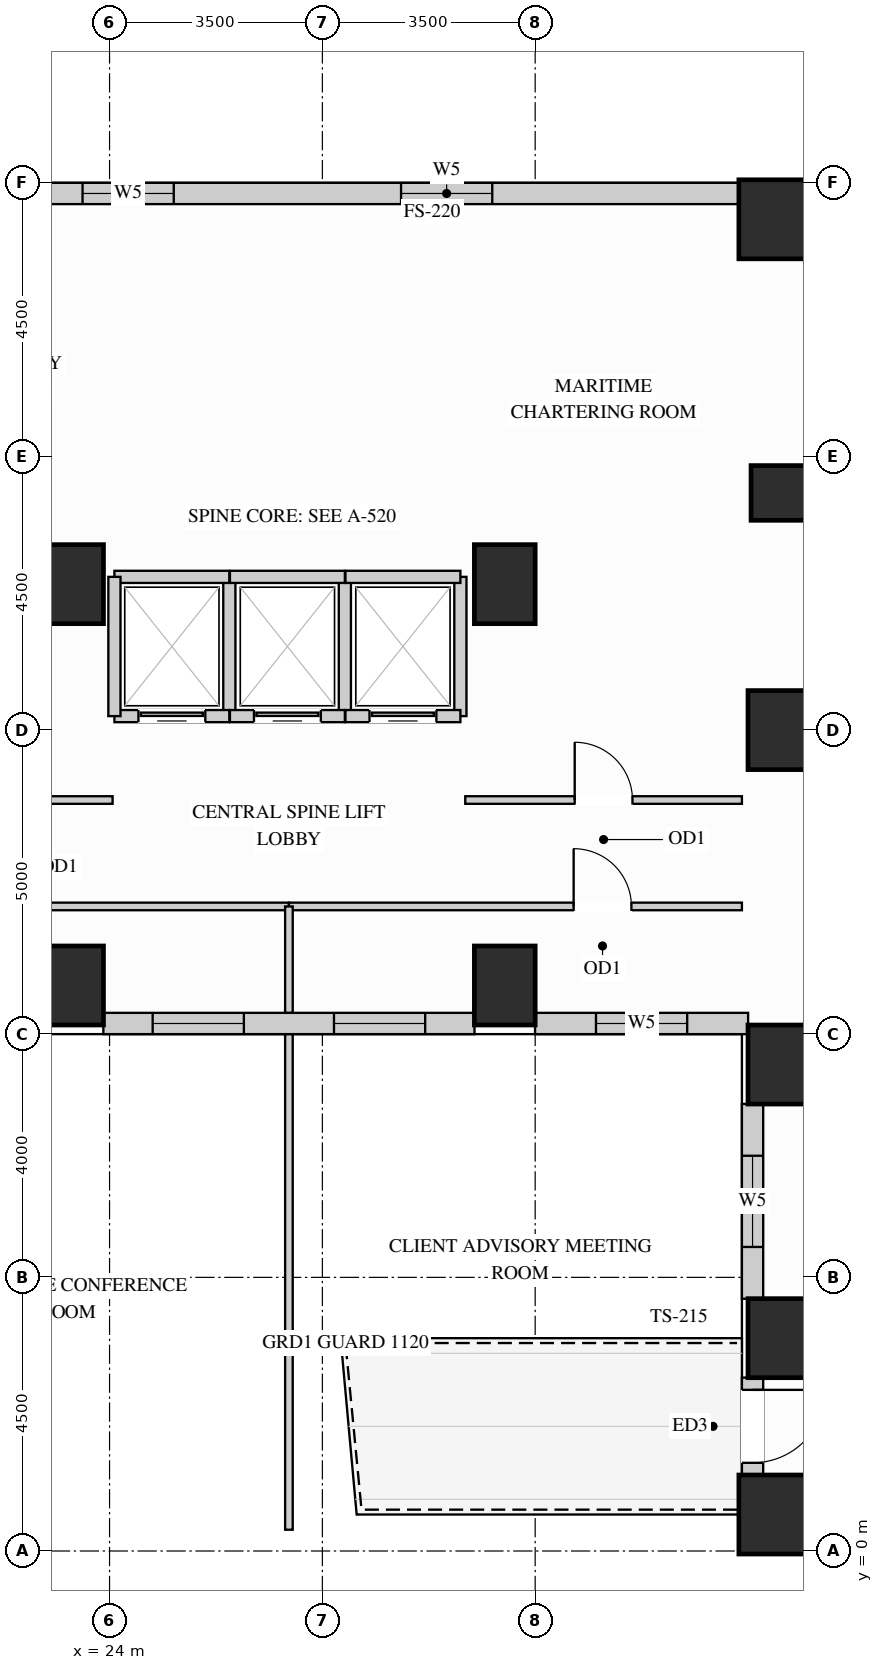
"""IFC4 building model, lengths in metres.
Left out: names, types, materials, properties, quantities, classifications, styles, units other than length and angle.
Written with IfcOpenShell. Run it as: python <this file> out.ifc"""

import sys

from ifc_helpers import new_model, si_unit, direction, frame, frame_2d, origin, origin_2d, place, context, subcontext, project, spatial, rectangle, extrude, source, transform, mapped, element, fill, save


model = new_model("IFC4")
c1 = context("Model", 3, precision=1e-05, world=origin(), true_north=direction((0.0, 1.0)))
c2 = subcontext(c1, "Body", "Model", "MODEL_VIEW")
j1 = project(units=[si_unit("LENGTHUNIT", "METRE"), si_unit("PLANEANGLEUNIT", "RADIAN")], contexts=[c1])
p1 = place(None, origin())
s1 = spatial("IfcSite", under=j1, at=p1, CompositionType="ELEMENT")
p2 = place(p1, origin())
s2 = spatial("IfcBuilding", under=s1, at=p2, CompositionType="ELEMENT")
p3 = place(p2, frame((0.0, 0.0, 62.1)))
s3 = spatial("IfcBuildingStorey", under=s2, at=p3, CompositionType="ELEMENT", Elevation=62.1)
m1 = source(origin(), c2, "Body", "SweptSolid", [
    extrude(rectangle(XDim=0.9, YDim=0.9, at=origin_2d()), origin(), (0.0, 0.0, 1.0), 3.38),
])
p4 = place(p3, frame((35.0, 17.4, 0.0), z_axis=(0.0, 0.0, 1.0), x_axis=(1.0, 0.0, 0.0)))
e1 = element("IfcColumn", 1, at=p4, inside=s3, PredefinedType="COLUMN", context=c2, shape_type="MappedRepresentation", body=[
    mapped(m1, transform((0.0, 0.0, 0.0), x_axis=(1.0, 0.0, 0.0), y_axis=(0.0, 1.0, 0.0), z_axis=(0.0, 0.0, 1.0))),
])
m2 = source(origin(), c2, "Body", "SweptSolid", [
    extrude(rectangle(XDim=1.0, YDim=1.3, at=origin_2d()), origin(), (0.0, 0.0, 1.0), 3.38),
])
for number, where, z_axis, x_axis in (
    (2, (35.0, 13.5, 0.0), (0.0, 0.0, 1.0), (1.0, 0.0, 0.0)),
    (3, (35.0, 3.5, 0.0), (0.0, 0.0, 1.0), (1.0, 0.0, 0.0)),
    (4, (35.0, 8.0, 0.0), (0.0, 0.0, 1.0), (1.0, 0.0, 0.0)),
    (5, (23.4, 15.9, 0.0), (0.0, 0.0, 1.0), (1.0, 0.0, 0.0)),
    (6, (23.4, 9.3, 0.0), (0.0, 0.0, 1.0), (1.0, 0.0, 0.0)),
    (7, (30.5, 15.9, 0.0), (0.0, 0.0, 1.0), (1.0, 0.0, 0.0)),
    (8, (30.5, 9.3, 0.0), (0.0, 0.0, 1.0), (1.0, 0.0, 0.0)),
):
    element("IfcColumn", number, at=place(p3, frame(where, z_axis=z_axis, x_axis=x_axis)), inside=s3, PredefinedType="COLUMN", context=c2, shape_type="MappedRepresentation", body=[
        mapped(m2, transform((0.0, 0.0, 0.0), x_axis=(1.0, 0.0, 0.0), y_axis=(0.0, 1.0, 0.0), z_axis=(0.0, 0.0, 1.0))),
    ])
m3 = source(origin(), c2, "Body", "SweptSolid", [
    extrude(rectangle(XDim=1.3, YDim=1.3, at=origin_2d()), origin(), (0.0, 0.0, 1.0), 3.38),
])
for number, where, z_axis, x_axis in (
    (9, (35.0, 21.9, 0.0), (0.0, 0.0, 1.0), (1.0, 0.0, 0.0)),
    (10, (35.0, 0.6, 0.0), (0.0, 0.0, 1.0), (1.0, 0.0, 0.0)),
):
    element("IfcColumn", number, at=place(p3, frame(where, z_axis=z_axis, x_axis=x_axis)), inside=s3, PredefinedType="COLUMN", context=c2, shape_type="MappedRepresentation", body=[
        mapped(m3, transform((0.0, 0.0, 0.0), x_axis=(1.0, 0.0, 0.0), y_axis=(0.0, 1.0, 0.0), z_axis=(0.0, 0.0, 1.0))),
    ])
p5 = place(p3, frame((23.898, 8.675, 0.0), z_axis=(0.0, 0.0, 1.0), x_axis=(1.0, 0.0, 0.0)))
e11 = element("IfcWall", 11, at=p5, inside=s3, PredefinedType="SOLIDWALL", context=c2, shape_type="SweptSolid", body=[
    extrude(rectangle(XDim=6.104, YDim=0.35, at=frame_2d((3.052, 0.0))), origin(), (0.0, 0.0, 1.0), 3.365),
])
p6 = place(p5, frame((0.811, 0.0, 0.78)))
e12 = element("IfcOpeningElement", 12, at=p6, cuts=e11, PredefinedType="OPENING", context=c2, shape_type="SweptSolid", body=[
    extrude(rectangle(XDim=1.5, YDim=2.0, at=frame_2d((0.75, 1.0))), frame((0.0, 0.185, 0.0), z_axis=(0.0, -1.0, 0.0), x_axis=(1.0, 0.0, 0.0)), (0.0, 0.0, 1.0), 0.37),
])
p7 = place(p5, frame((3.793, 0.0, 0.78)))
e13 = element("IfcOpeningElement", 13, at=p7, cuts=e11, PredefinedType="OPENING", context=c2, shape_type="SweptSolid", body=[
    extrude(rectangle(XDim=1.5, YDim=2.0, at=frame_2d((0.75, 1.0))), frame((0.0, 0.185, 0.0), z_axis=(0.0, -1.0, 0.0), x_axis=(1.0, 0.0, 0.0)), (0.0, 0.0, 1.0), 0.37),
])
p8 = place(p3, frame((30.998, 8.675, 0.0), z_axis=(0.0, 0.0, 1.0), x_axis=(1.0, 0.0, 0.0)))
e14 = element("IfcWall", 14, at=p8, inside=s3, PredefinedType="SOLIDWALL", context=c2, shape_type="SweptSolid", body=[
    extrude(rectangle(XDim=3.504, YDim=0.35, at=frame_2d((1.752, 0.0))), origin(), (0.0, 0.0, 1.0), 3.365),
])
p9 = place(p8, frame((1.002, 0.0, 0.78)))
e15 = element("IfcOpeningElement", 15, at=p9, cuts=e14, PredefinedType="OPENING", context=c2, shape_type="SweptSolid", body=[
    extrude(rectangle(XDim=1.5, YDim=2.0, at=frame_2d((0.75, 1.0))), frame((0.0, 0.185, 0.0), z_axis=(0.0, -1.0, 0.0), x_axis=(1.0, 0.0, 0.0)), (0.0, 0.0, 1.0), 0.37),
])
p10 = place(p3, frame((34.575, 7.352, 0.0), z_axis=(0.0, 0.0, 1.0), x_axis=(0.0, -1.0, 0.0)))
e16 = element("IfcWall", 16, at=p10, inside=s3, PredefinedType="SOLIDWALL", context=c2, shape_type="SweptSolid", body=[
    extrude(rectangle(XDim=3.204, YDim=0.35, at=frame_2d((1.602, 0.0))), origin(), (0.0, 0.0, 1.0), 2.51),
])
p11 = place(p10, frame((0.852, 0.0, 0.78)))
e17 = element("IfcOpeningElement", 17, at=p11, cuts=e16, PredefinedType="OPENING", context=c2, shape_type="SweptSolid", body=[
    extrude(rectangle(XDim=1.5, YDim=1.55, at=frame_2d((0.75, 0.775))), frame((0.0, 0.185, 0.0), z_axis=(0.0, -1.0, 0.0), x_axis=(1.0, 0.0, 0.0)), (0.0, 0.0, 1.0), 0.37),
])
p12 = place(p3, frame((34.575, 2.852, 0.0), z_axis=(0.0, 0.0, 1.0), x_axis=(0.0, -1.0, 0.0)))
e18 = element("IfcWall", 18, at=p12, inside=s3, PredefinedType="SOLIDWALL", context=c2, shape_type="SweptSolid", body=[
    extrude(rectangle(XDim=1.604, YDim=0.35, at=frame_2d((0.802, 0.0))), origin(), (0.0, 0.0, 1.0), 2.51),
])
p13 = place(p12, frame((0.202, 0.0, 0.0)))
e19 = element("IfcOpeningElement", 19, at=p13, cuts=e18, PredefinedType="OPENING", context=c2, shape_type="SweptSolid", body=[
    extrude(rectangle(XDim=1.2, YDim=2.15, at=frame_2d((0.6, 1.075))), frame((0.0, 0.185, 0.0), z_axis=(0.0, -1.0, 0.0), x_axis=(1.0, 0.0, 0.0)), (0.0, 0.0, 1.0), 0.37),
])
p14 = place(p3, frame((34.352, 22.325, 0.0), z_axis=(0.0, 0.0, 1.0), x_axis=(-1.0, 0.0, 0.0)))
e20 = element("IfcWall", 20, at=p14, inside=s3, PredefinedType="SOLIDWALL", context=c2, shape_type="SweptSolid", body=[
    extrude(rectangle(XDim=14.854, YDim=0.35, at=frame_2d((7.427, 0.0))), origin(), (0.0, 0.0, 1.0), 3.365),
])
p15 = place(p14, frame((4.058, 0.0, 0.78)))
e21 = element("IfcOpeningElement", 21, at=p15, cuts=e20, PredefinedType="OPENING", context=c2, shape_type="SweptSolid", body=[
    extrude(rectangle(XDim=1.5, YDim=2.0, at=frame_2d((0.75, 1.0))), frame((0.0, 0.185, 0.0), z_axis=(0.0, -1.0, 0.0), x_axis=(1.0, 0.0, 0.0)), (0.0, 0.0, 1.0), 0.37),
])
p16 = place(p14, frame((9.296, 0.0, 0.78)))
e22 = element("IfcOpeningElement", 22, at=p16, cuts=e20, PredefinedType="OPENING", context=c2, shape_type="SweptSolid", body=[
    extrude(rectangle(XDim=1.5, YDim=2.0, at=frame_2d((0.75, 1.0))), frame((0.0, 0.185, 0.0), z_axis=(0.0, -1.0, 0.0), x_axis=(1.0, 0.0, 0.0)), (0.0, 0.0, 1.0), 0.37),
])
p17 = place(p3, frame((29.85, 12.35, 0.0), z_axis=(0.0, 0.0, 1.0), x_axis=(1.0, 0.0, 0.0)))
e23 = element("IfcWall", 23, at=p17, inside=s3, PredefinedType="PARTITIONING", context=c2, shape_type="SweptSolid", body=[
    extrude(rectangle(XDim=4.55, YDim=0.125, at=frame_2d((2.275, 0.0))), origin(), (0.0, 0.0, 1.0), 3.365),
])
p18 = place(p17, frame((1.8, 0.0, 0.0)))
e24 = element("IfcOpeningElement", 24, at=p18, cuts=e23, PredefinedType="OPENING", context=c2, shape_type="SweptSolid", body=[
    extrude(rectangle(XDim=0.95, YDim=2.15, at=frame_2d((0.475, 1.075))), frame((0.0, 0.073, 0.0), z_axis=(0.0, -1.0, 0.0), x_axis=(1.0, 0.0, 0.0)), (0.0, 0.0, 1.0), 0.145),
])
p19 = place(p3, frame((19.5, 12.35, 0.0), z_axis=(0.0, 0.0, 1.0), x_axis=(1.0, 0.0, 0.0)))
e25 = element("IfcWall", 25, at=p19, inside=s3, PredefinedType="PARTITIONING", context=c2, shape_type="SweptSolid", body=[
    extrude(rectangle(XDim=4.55, YDim=0.125, at=frame_2d((2.275, 0.0))), origin(), (0.0, 0.0, 1.0), 3.365),
])
p20 = place(p19, frame((1.8, 0.0, 0.0)))
e26 = element("IfcOpeningElement", 26, at=p20, cuts=e25, PredefinedType="OPENING", context=c2, shape_type="SweptSolid", body=[
    extrude(rectangle(XDim=0.95, YDim=2.15, at=frame_2d((0.475, 1.075))), frame((0.0, 0.073, 0.0), z_axis=(0.0, -1.0, 0.0), x_axis=(1.0, 0.0, 0.0)), (0.0, 0.0, 1.0), 0.145),
])
p21 = place(p3, frame((19.5, 10.6, 0.0), z_axis=(0.0, 0.0, 1.0), x_axis=(1.0, 0.0, 0.0)))
e27 = element("IfcWall", 27, at=p21, inside=s3, PredefinedType="PARTITIONING", context=c2, shape_type="SweptSolid", body=[
    extrude(rectangle(XDim=7.45, YDim=0.125, at=frame_2d((3.725, 0.0))), origin(), (0.0, 0.0, 1.0), 3.365),
])
p22 = place(p21, frame((1.817, 0.0, 0.0)))
e28 = element("IfcOpeningElement", 28, at=p22, cuts=e27, PredefinedType="OPENING", context=c2, shape_type="SweptSolid", body=[
    extrude(rectangle(XDim=0.95, YDim=2.15, at=frame_2d((0.475, 1.075))), frame((0.0, 0.073, 0.0), z_axis=(0.0, -1.0, 0.0), x_axis=(1.0, 0.0, 0.0)), (0.0, 0.0, 1.0), 0.145),
])
p23 = place(p3, frame((26.95, 10.6, 0.0), z_axis=(0.0, 0.0, 1.0), x_axis=(1.0, 0.0, 0.0)))
e29 = element("IfcWall", 29, at=p23, inside=s3, PredefinedType="PARTITIONING", context=c2, shape_type="SweptSolid", body=[
    extrude(rectangle(XDim=7.45, YDim=0.125, at=frame_2d((3.725, 0.0))), origin(), (0.0, 0.0, 1.0), 3.365),
])
p24 = place(p23, frame((4.683, 0.0, 0.0)))
e30 = element("IfcOpeningElement", 30, at=p24, cuts=e29, PredefinedType="OPENING", context=c2, shape_type="SweptSolid", body=[
    extrude(rectangle(XDim=0.95, YDim=2.15, at=frame_2d((0.475, 1.075))), frame((0.0, 0.073, 0.0), z_axis=(0.0, -1.0, 0.0), x_axis=(1.0, 0.0, 0.0)), (0.0, 0.0, 1.0), 0.145),
])
m4 = source(origin(), c2, "Body", "SweptSolid", [
    extrude(rectangle(XDim=8.148, YDim=0.125, at=frame_2d((4.074, 0.0))), origin(), (0.0, 0.0, 1.0), 3.365),
])
p25 = place(p3, frame((26.95, 0.35, 0.0), z_axis=(0.0, 0.0, 1.0), x_axis=(0.0, 1.0, 0.0)))
e31 = element("IfcWall", 31, at=p25, inside=s3, PredefinedType="PARTITIONING", context=c2, shape_type="MappedRepresentation", body=[
    mapped(m4, transform((0.0, 0.0, 0.0), x_axis=(1.0, 0.0, 0.0), y_axis=(0.0, 1.0, 0.0), z_axis=(0.0, 0.0, 1.0))),
])
m5 = source(origin(), c2, "Body", "SweptSolid", [
    extrude(rectangle(XDim=1.748, YDim=0.125, at=frame_2d((0.874, 0.0))), origin(), (0.0, 0.0, 1.0), 3.365),
])
p26 = place(p3, frame((26.95, 8.852, 0.0), z_axis=(0.0, 0.0, 1.0), x_axis=(0.0, 1.0, 0.0)))
e32 = element("IfcWall", 32, at=p26, inside=s3, PredefinedType="PARTITIONING", context=c2, shape_type="MappedRepresentation", body=[
    mapped(m5, transform((0.0, 0.0, 0.0), x_axis=(1.0, 0.0, 0.0), y_axis=(0.0, 1.0, 0.0), z_axis=(0.0, 0.0, 1.0))),
])
m6 = source(origin(), c2, "Body", "SweptSolid", [
    extrude(rectangle(XDim=2.29, YDim=0.2, at=frame_2d((1.145, 0.0))), origin(), (0.0, 0.0, 1.0), 3.365),
])
p27 = place(p3, frame((25.97, 13.73, 0.0), z_axis=(0.0, 0.0, 1.0), x_axis=(0.0, 1.0, 0.0)))
e33 = element("IfcWall", 33, at=p27, inside=s3, PredefinedType="PARTITIONING", context=c2, shape_type="MappedRepresentation", body=[
    mapped(m6, transform((0.0, 0.0, 0.0), x_axis=(1.0, 0.0, 0.0), y_axis=(0.0, 1.0, 0.0), z_axis=(0.0, 0.0, 1.0))),
])
m7 = source(origin(), c2, "Body", "SweptSolid", [
    extrude(rectangle(XDim=1.89, YDim=0.2, at=frame_2d((0.945, 0.0))), origin(), (0.0, 0.0, 1.0), 2.67),
])
p28 = place(p3, frame((24.08, 16.02, 0.0), z_axis=(0.0, 0.0, 1.0), x_axis=(1.0, 0.0, 0.0)))
e34 = element("IfcWall", 34, at=p28, inside=s3, PredefinedType="PARTITIONING", context=c2, shape_type="MappedRepresentation", body=[
    mapped(m7, transform((0.0, 0.0, 0.0), x_axis=(1.0, 0.0, 0.0), y_axis=(0.0, 1.0, 0.0), z_axis=(0.0, 0.0, 1.0))),
])
p29 = place(p3, frame((24.08, 13.73, 0.0), z_axis=(0.0, 0.0, 1.0), x_axis=(1.0, 0.0, 0.0)))
e35 = element("IfcWall", 35, at=p29, inside=s3, PredefinedType="PARTITIONING", context=c2, shape_type="SweptSolid", body=[
    extrude(rectangle(XDim=1.89, YDim=0.2, at=frame_2d((0.945, 0.0))), origin(), (0.0, 0.0, 1.0), 2.446),
])
p30 = place(p29, frame((0.395, 0.0, 0.0)))
e36 = element("IfcOpeningElement", 36, at=p30, cuts=e35, PredefinedType="OPENING", context=c2, shape_type="SweptSolid", body=[
    extrude(rectangle(XDim=1.1, YDim=2.2, at=frame_2d((0.55, 1.1))), frame((0.0, 0.11, 0.0), z_axis=(0.0, -1.0, 0.0), x_axis=(1.0, 0.0, 0.0)), (0.0, 0.0, 1.0), 0.22),
])
for number, where, z_axis, x_axis in (
    (37, (24.08, 13.73, 0.0), (0.0, 0.0, 1.0), (0.0, 1.0, 0.0)),
    (38, (27.87, 13.73, 0.0), (0.0, 0.0, 1.0), (0.0, 1.0, 0.0)),
):
    element("IfcWall", number, at=place(p3, frame(where, z_axis=z_axis, x_axis=x_axis)), inside=s3, PredefinedType="PARTITIONING", context=c2, shape_type="MappedRepresentation", body=[
        mapped(m6, transform((0.0, 0.0, 0.0), x_axis=(1.0, 0.0, 0.0), y_axis=(0.0, 1.0, 0.0), z_axis=(0.0, 0.0, 1.0))),
    ])
m8 = source(origin(), c2, "Body", "SweptSolid", [
    extrude(rectangle(XDim=1.89, YDim=0.2, at=frame_2d((0.945, 0.0))), origin(), (0.0, 0.0, 1.0), 2.67),
])
p31 = place(p3, frame((25.98, 16.02, 0.0), z_axis=(0.0, 0.0, 1.0), x_axis=(1.0, 0.0, 0.0)))
e39 = element("IfcWall", 39, at=p31, inside=s3, PredefinedType="PARTITIONING", context=c2, shape_type="MappedRepresentation", body=[
    mapped(m8, transform((0.0, 0.0, 0.0), x_axis=(1.0, 0.0, 0.0), y_axis=(0.0, 1.0, 0.0), z_axis=(0.0, 0.0, 1.0))),
])
p32 = place(p3, frame((25.98, 13.73, 0.0), z_axis=(0.0, 0.0, 1.0), x_axis=(1.0, 0.0, 0.0)))
e40 = element("IfcWall", 40, at=p32, inside=s3, PredefinedType="PARTITIONING", context=c2, shape_type="SweptSolid", body=[
    extrude(rectangle(XDim=1.89, YDim=0.2, at=frame_2d((0.945, 0.0))), origin(), (0.0, 0.0, 1.0), 2.446),
])
p33 = place(p32, frame((0.395, 0.0, 0.0)))
e41 = element("IfcOpeningElement", 41, at=p33, cuts=e40, PredefinedType="OPENING", context=c2, shape_type="SweptSolid", body=[
    extrude(rectangle(XDim=1.1, YDim=2.2, at=frame_2d((0.55, 1.1))), frame((0.0, 0.11, 0.0), z_axis=(0.0, -1.0, 0.0), x_axis=(1.0, 0.0, 0.0)), (0.0, 0.0, 1.0), 0.22),
])
p34 = place(p3, frame((29.77, 13.73, 0.0), z_axis=(0.0, 0.0, 1.0), x_axis=(0.0, 1.0, 0.0)))
e42 = element("IfcWall", 42, at=p34, inside=s3, PredefinedType="PARTITIONING", context=c2, shape_type="MappedRepresentation", body=[
    mapped(m6, transform((0.0, 0.0, 0.0), x_axis=(1.0, 0.0, 0.0), y_axis=(0.0, 1.0, 0.0), z_axis=(0.0, 0.0, 1.0))),
])
p35 = place(p3, frame((27.88, 16.02, 0.0), z_axis=(0.0, 0.0, 1.0), x_axis=(1.0, 0.0, 0.0)))
e43 = element("IfcWall", 43, at=p35, inside=s3, PredefinedType="PARTITIONING", context=c2, shape_type="MappedRepresentation", body=[
    mapped(m8, transform((0.0, 0.0, 0.0), x_axis=(1.0, 0.0, 0.0), y_axis=(0.0, 1.0, 0.0), z_axis=(0.0, 0.0, 1.0))),
])
p36 = place(p3, frame((27.88, 13.73, 0.0), z_axis=(0.0, 0.0, 1.0), x_axis=(1.0, 0.0, 0.0)))
e44 = element("IfcWall", 44, at=p36, inside=s3, PredefinedType="PARTITIONING", context=c2, shape_type="SweptSolid", body=[
    extrude(rectangle(XDim=1.89, YDim=0.2, at=frame_2d((0.945, 0.0))), origin(), (0.0, 0.0, 1.0), 2.446),
])
p37 = place(p36, frame((0.395, 0.0, 0.0)))
e45 = element("IfcOpeningElement", 45, at=p37, cuts=e44, PredefinedType="OPENING", context=c2, shape_type="SweptSolid", body=[
    extrude(rectangle(XDim=1.1, YDim=2.2, at=frame_2d((0.55, 1.1))), frame((0.0, 0.11, 0.0), z_axis=(0.0, -1.0, 0.0), x_axis=(1.0, 0.0, 0.0)), (0.0, 0.0, 1.0), 0.22),
])
m9 = source(origin(), c2, "Body", "SweptSolid", [
    extrude(rectangle(XDim=1.2, YDim=2.15, at=frame_2d((0.6, 1.075))), frame((0.0, 0.025, 0.0), z_axis=(0.0, -1.0, 0.0), x_axis=(1.0, 0.0, 0.0)), (0.0, 0.0, 1.0), 0.05),
])
p38 = place(p13, frame((1.2, 0.0, 0.0), z_axis=(0.0, 0.0, 1.0), x_axis=(-1.0, 0.0, 0.0)))
e46 = element("IfcDoor", 46, at=p38, inside=s3, OperationType="SINGLE_SWING_LEFT", PredefinedType="DOOR", context=c2, shape_type="MappedRepresentation", body=[
    mapped(m9, transform((0.0, 0.0, 0.0), x_axis=(1.0, 0.0, 0.0), y_axis=(0.0, 1.0, 0.0), z_axis=(0.0, 0.0, 1.0))),
])
fill(e19, e46)
m10 = source(origin(), c2, "Body", "SweptSolid", [
    extrude(rectangle(XDim=1.1, YDim=2.2, at=frame_2d((0.55, 1.1))), frame((0.0, 0.025, 0.0), z_axis=(0.0, -1.0, 0.0), x_axis=(1.0, 0.0, 0.0)), (0.0, 0.0, 1.0), 0.05),
])
p39 = place(p30, origin())
e47 = element("IfcDoor", 47, at=p39, inside=s3, OperationType="SLIDING_TO_LEFT", PredefinedType="DOOR", context=c2, shape_type="MappedRepresentation", body=[
    mapped(m10, transform((0.0, 0.0, 0.0), x_axis=(1.0, 0.0, 0.0), y_axis=(0.0, 1.0, 0.0), z_axis=(0.0, 0.0, 1.0))),
])
fill(e36, e47)
p40 = place(p33, origin())
e48 = element("IfcDoor", 48, at=p40, inside=s3, OperationType="SLIDING_TO_LEFT", PredefinedType="DOOR", context=c2, shape_type="MappedRepresentation", body=[
    mapped(m10, transform((0.0, 0.0, 0.0), x_axis=(1.0, 0.0, 0.0), y_axis=(0.0, 1.0, 0.0), z_axis=(0.0, 0.0, 1.0))),
])
fill(e41, e48)
p41 = place(p37, origin())
e49 = element("IfcDoor", 49, at=p41, inside=s3, OperationType="SLIDING_TO_LEFT", PredefinedType="DOOR", context=c2, shape_type="MappedRepresentation", body=[
    mapped(m10, transform((0.0, 0.0, 0.0), x_axis=(1.0, 0.0, 0.0), y_axis=(0.0, 1.0, 0.0), z_axis=(0.0, 0.0, 1.0))),
])
fill(e45, e49)
m11 = source(origin(), c2, "Body", "SweptSolid", [
    extrude(rectangle(XDim=0.95, YDim=2.15, at=frame_2d((0.475, 1.075))), frame((0.0, 0.025, 0.0), z_axis=(0.0, -1.0, 0.0), x_axis=(1.0, 0.0, 0.0)), (0.0, 0.0, 1.0), 0.05),
])
p42 = place(p18, origin())
e50 = element("IfcDoor", 50, at=p42, inside=s3, OperationType="SINGLE_SWING_LEFT", PredefinedType="DOOR", context=c2, shape_type="MappedRepresentation", body=[
    mapped(m11, transform((0.0, 0.0, 0.0), x_axis=(1.0, 0.0, 0.0), y_axis=(0.0, 1.0, 0.0), z_axis=(0.0, 0.0, 1.0))),
])
fill(e24, e50)
p43 = place(p24, origin())
e51 = element("IfcDoor", 51, at=p43, inside=s3, OperationType="SINGLE_SWING_LEFT", PredefinedType="DOOR", context=c2, shape_type="MappedRepresentation", body=[
    mapped(m11, transform((0.0, 0.0, 0.0), x_axis=(1.0, 0.0, 0.0), y_axis=(0.0, 1.0, 0.0), z_axis=(0.0, 0.0, 1.0))),
])
fill(e30, e51)
m12 = source(origin(), c2, "Body", "SweptSolid", [
    extrude(rectangle(XDim=1.5, YDim=2.0, at=frame_2d((0.75, 1.0))), frame((0.0, 0.03, 0.0), z_axis=(0.0, -1.0, 0.0), x_axis=(1.0, 0.0, 0.0)), (0.0, 0.0, 1.0), 0.06),
])
p44 = place(p6, origin())
e52 = element("IfcWindow", 52, at=p44, inside=s3, PartitioningType="SINGLE_PANEL", PredefinedType="WINDOW", context=c2, shape_type="MappedRepresentation", body=[
    mapped(m12, transform((0.0, 0.0, 0.0), x_axis=(1.0, 0.0, 0.0), y_axis=(0.0, 1.0, 0.0), z_axis=(0.0, 0.0, 1.0))),
])
fill(e12, e52)
p45 = place(p7, origin())
e53 = element("IfcWindow", 53, at=p45, inside=s3, PartitioningType="SINGLE_PANEL", PredefinedType="WINDOW", context=c2, shape_type="MappedRepresentation", body=[
    mapped(m12, transform((0.0, 0.0, 0.0), x_axis=(1.0, 0.0, 0.0), y_axis=(0.0, 1.0, 0.0), z_axis=(0.0, 0.0, 1.0))),
])
fill(e13, e53)
p46 = place(p9, origin())
e54 = element("IfcWindow", 54, at=p46, inside=s3, PartitioningType="SINGLE_PANEL", PredefinedType="WINDOW", context=c2, shape_type="MappedRepresentation", body=[
    mapped(m12, transform((0.0, 0.0, 0.0), x_axis=(1.0, 0.0, 0.0), y_axis=(0.0, 1.0, 0.0), z_axis=(0.0, 0.0, 1.0))),
])
fill(e15, e54)
m13 = source(origin(), c2, "Body", "SweptSolid", [
    extrude(rectangle(XDim=1.5, YDim=1.55, at=frame_2d((0.75, 0.775))), frame((0.0, 0.03, 0.0), z_axis=(0.0, -1.0, 0.0), x_axis=(1.0, 0.0, 0.0)), (0.0, 0.0, 1.0), 0.06),
])
p47 = place(p11, origin())
e55 = element("IfcWindow", 55, at=p47, inside=s3, PartitioningType="SINGLE_PANEL", PredefinedType="WINDOW", context=c2, shape_type="MappedRepresentation", body=[
    mapped(m13, transform((0.0, 0.0, 0.0), x_axis=(1.0, 0.0, 0.0), y_axis=(0.0, 1.0, 0.0), z_axis=(0.0, 0.0, 1.0))),
])
fill(e17, e55)
p48 = place(p15, origin())
e56 = element("IfcWindow", 56, at=p48, inside=s3, PartitioningType="SINGLE_PANEL", PredefinedType="WINDOW", context=c2, shape_type="MappedRepresentation", body=[
    mapped(m12, transform((0.0, 0.0, 0.0), x_axis=(1.0, 0.0, 0.0), y_axis=(0.0, 1.0, 0.0), z_axis=(0.0, 0.0, 1.0))),
])
fill(e21, e56)
p49 = place(p16, origin())
e57 = element("IfcWindow", 57, at=p49, inside=s3, PartitioningType="SINGLE_PANEL", PredefinedType="WINDOW", context=c2, shape_type="MappedRepresentation", body=[
    mapped(m12, transform((0.0, 0.0, 0.0), x_axis=(1.0, 0.0, 0.0), y_axis=(0.0, 1.0, 0.0), z_axis=(0.0, 0.0, 1.0))),
])
fill(e22, e57)
save(model, sys.argv[1])
